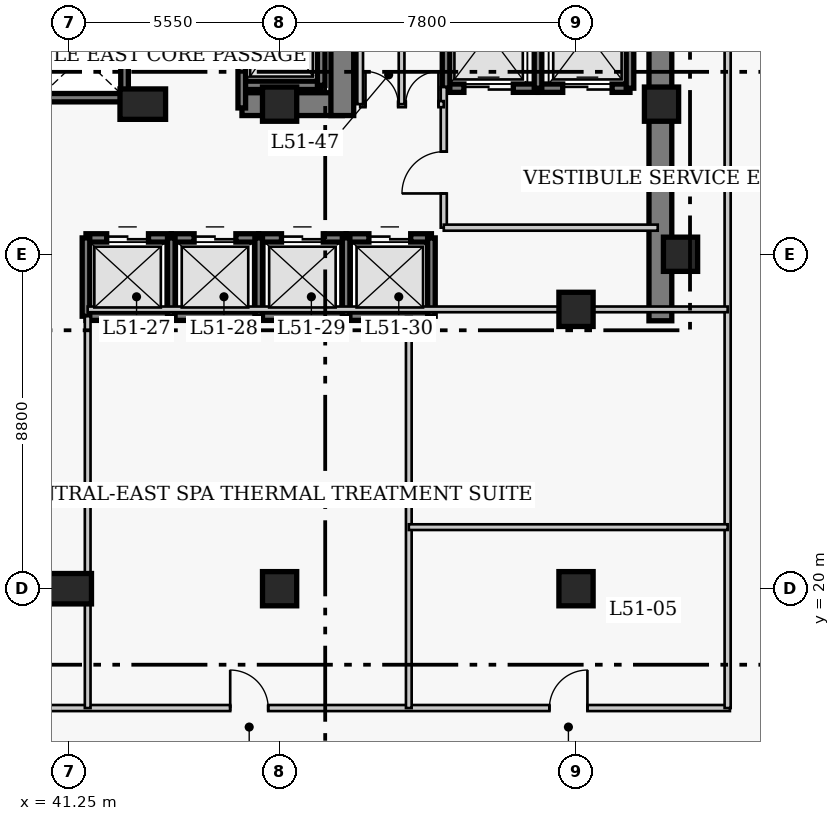
"""IFC4 building model, lengths in metres.
Left out: names, types, materials, properties, quantities, classifications, styles, units other than length and angle.
Written with IfcOpenShell. Run it as: python <this file> out.ifc"""

import sys

from ifc_helpers import new_model, si_unit, direction, frame, frame_2d, origin, origin_2d, place, context, subcontext, project, spatial, rectangle, extrude, element, fill, save


model = new_model("IFC4")
c1 = context("Model", 3, precision=1e-05, world=origin(), true_north=direction((0.0, 1.0)))
c2 = subcontext(c1, "Body", "Model", "MODEL_VIEW")
j1 = project(units=[si_unit("LENGTHUNIT", "METRE"), si_unit("PLANEANGLEUNIT", "RADIAN")], contexts=[c1])
p1 = place(None, origin())
s1 = spatial("IfcSite", under=j1, at=p1, CompositionType="ELEMENT")
p2 = place(p1, origin())
s2 = spatial("IfcBuilding", under=s1, at=p2, CompositionType="ELEMENT")
p3 = place(p2, frame((0.0, 0.0, 204.6)))
s3 = spatial("IfcBuildingStorey", under=s2, at=p3, CompositionType="ELEMENT", Elevation=204.6)
p4 = place(p3, frame((56.82, 27.05, 0.0), z_axis=(0.0, 0.0, 1.0), x_axis=(0.0, 1.0, 0.0)))
e1 = element("IfcWall", 1, at=p4, inside=s3, PredefinedType="SHEAR", context=c2, shape_type="SweptSolid", body=[
    extrude(rectangle(XDim=13.57, YDim=0.6, at=frame_2d((6.785, 0.0))), origin(), (0.0, 0.0, 1.0), 3.9),
])
p5 = place(p3, frame((45.81, 32.75, 0.0), z_axis=(0.0, 0.0, 1.0), x_axis=(1.0, 0.0, 0.0)))
e2 = element("IfcWall", 2, at=p5, inside=s3, PredefinedType="SHEAR", context=c2, shape_type="SweptSolid", body=[
    extrude(rectangle(XDim=2.64, YDim=0.6, at=frame_2d((1.32, 0.0))), origin(), (0.0, 0.0, 1.0), 3.9),
])
p6 = place(p3, frame((48.45, 32.45, 0.0), z_axis=(0.0, 0.0, 1.0), x_axis=(0.0, 1.0, 0.0)))
e3 = element("IfcWall", 3, at=p6, inside=s3, PredefinedType="SHEAR", context=c2, shape_type="SweptSolid", body=[
    extrude(rectangle(XDim=7.87, YDim=0.6, at=frame_2d((3.935, 0.0))), origin(), (0.0, 0.0, 1.0), 3.9),
])
p7 = place(p6, frame((5.75, 0.0, 0.0)))
e4 = element("IfcOpeningElement", 4, at=p7, cuts=e3, PredefinedType="OPENING", context=c2, shape_type="SweptSolid", body=[
    extrude(rectangle(XDim=1.1, YDim=2.15, at=frame_2d((0.55, 1.075))), frame((0.0, 0.31, 0.0), z_axis=(0.0, -1.0, 0.0), x_axis=(1.0, 0.0, 0.0)), (0.0, 0.0, 1.0), 0.62),
])
p8 = place(p3, frame((41.25, 20.0, 0.0), z_axis=(0.0, 0.0, 1.0), x_axis=(1.0, 0.0, 0.0)))
e5 = element("IfcColumn", 5, at=p8, inside=s3, PredefinedType="COLUMN", context=c2, shape_type="SweptSolid", body=[
    extrude(rectangle(XDim=1.2, YDim=0.8, at=origin_2d()), origin(), (0.0, 0.0, 1.0), 3.9),
])
for number, where, z_axis, x_axis in (
    (6, (46.8, 20.0, 0.0), (0.0, 0.0, 1.0), (1.0, 0.0, 0.0)),
    (7, (54.6, 20.0, 0.0), (0.0, 0.0, 1.0), (1.0, 0.0, 0.0)),
    (8, (57.35, 28.8, 0.0), (0.0, 0.0, 1.0), (1.0, 0.0, 0.0)),
):
    element("IfcColumn", number, at=place(p3, frame(where, z_axis=z_axis, x_axis=x_axis)), inside=s3, PredefinedType="COLUMN", context=c2, shape_type="SweptSolid", body=[
        extrude(rectangle(XDim=0.9, YDim=0.9, at=origin_2d()), origin(), (0.0, 0.0, 1.0), 3.9),
    ])
p9 = place(p3, frame((43.2, 32.75, 0.0), z_axis=(0.0, 0.0, 1.0), x_axis=(1.0, 0.0, 0.0)))
e9 = element("IfcColumn", 9, at=p9, inside=s3, PredefinedType="COLUMN", context=c2, shape_type="SweptSolid", body=[
    extrude(rectangle(XDim=1.2, YDim=0.8, at=origin_2d()), origin(), (0.0, 0.0, 1.0), 3.9),
])
for number, where, z_axis, x_axis in (
    (10, (46.8, 32.75, 0.0), (0.0, 0.0, 1.0), (1.0, 0.0, 0.0)),
    (11, (54.6, 27.35, 0.0), (0.0, 0.0, 1.0), (1.0, 0.0, 0.0)),
    (12, (56.85, 32.75, 0.0), (0.0, 0.0, 1.0), (1.0, 0.0, 0.0)),
):
    element("IfcColumn", number, at=place(p3, frame(where, z_axis=z_axis, x_axis=x_axis)), inside=s3, PredefinedType="COLUMN", context=c2, shape_type="SweptSolid", body=[
        extrude(rectangle(XDim=0.9, YDim=0.9, at=origin_2d()), origin(), (0.0, 0.0, 1.0), 3.9),
    ])
p10 = place(p3, frame((41.705, 29.23, 0.0), z_axis=(0.0, 0.0, 1.0), x_axis=(1.0, 0.0, 0.0)))
e13 = element("IfcWall", 13, at=p10, inside=s3, PredefinedType="SHEAR", context=c2, shape_type="SweptSolid", body=[
    extrude(rectangle(XDim=2.245, YDim=0.22, at=frame_2d((1.123, 0.0))), origin(), (0.0, 0.0, 1.0), 3.9),
])
p11 = place(p10, frame((0.545, 0.0, 0.0)))
e14 = element("IfcOpeningElement", 14, at=p11, cuts=e13, PredefinedType="OPENING", context=c2, shape_type="SweptSolid", body=[
    extrude(rectangle(XDim=1.1, YDim=2.15, at=frame_2d((0.55, 1.075))), frame((0.0, 0.12, 0.0), z_axis=(0.0, -1.0, 0.0), x_axis=(1.0, 0.0, 0.0)), (0.0, 0.0, 1.0), 0.24),
])
p12 = place(p3, frame((41.705, 27.17, 0.0), z_axis=(0.0, 0.0, 1.0), x_axis=(1.0, 0.0, 0.0)))
e15 = element("IfcWall", 15, at=p12, inside=s3, PredefinedType="SHEAR", context=c2, shape_type="SweptSolid", body=[
    extrude(rectangle(XDim=2.245, YDim=0.22, at=frame_2d((1.123, 0.0))), origin(), (0.0, 0.0, 1.0), 3.9),
])
p13 = place(p3, frame((41.705, 27.17, 0.0), z_axis=(0.0, 0.0, 1.0), x_axis=(0.0, 1.0, 0.0)))
e16 = element("IfcWall", 16, at=p13, inside=s3, PredefinedType="SHEAR", context=c2, shape_type="SweptSolid", body=[
    extrude(rectangle(XDim=2.06, YDim=0.2, at=frame_2d((1.03, 0.0))), origin(), (0.0, 0.0, 1.0), 3.9),
])
p14 = place(p3, frame((43.95, 29.23, 0.0), z_axis=(0.0, 0.0, 1.0), x_axis=(1.0, 0.0, 0.0)))
e17 = element("IfcWall", 17, at=p14, inside=s3, PredefinedType="SHEAR", context=c2, shape_type="SweptSolid", body=[
    extrude(rectangle(XDim=2.3, YDim=0.22, at=frame_2d((1.15, 0.0))), origin(), (0.0, 0.0, 1.0), 3.9),
])
p15 = place(p14, frame((0.6, 0.0, 0.0)))
e18 = element("IfcOpeningElement", 18, at=p15, cuts=e17, PredefinedType="OPENING", context=c2, shape_type="SweptSolid", body=[
    extrude(rectangle(XDim=1.1, YDim=2.15, at=frame_2d((0.55, 1.075))), frame((0.0, 0.12, 0.0), z_axis=(0.0, -1.0, 0.0), x_axis=(1.0, 0.0, 0.0)), (0.0, 0.0, 1.0), 0.24),
])
p16 = place(p3, frame((43.95, 27.17, 0.0), z_axis=(0.0, 0.0, 1.0), x_axis=(1.0, 0.0, 0.0)))
e19 = element("IfcWall", 19, at=p16, inside=s3, PredefinedType="SHEAR", context=c2, shape_type="SweptSolid", body=[
    extrude(rectangle(XDim=2.3, YDim=0.22, at=frame_2d((1.15, 0.0))), origin(), (0.0, 0.0, 1.0), 3.9),
])
p17 = place(p3, frame((43.95, 27.17, 0.0), z_axis=(0.0, 0.0, 1.0), x_axis=(0.0, 1.0, 0.0)))
e20 = element("IfcWall", 20, at=p17, inside=s3, PredefinedType="SHEAR", context=c2, shape_type="SweptSolid", body=[
    extrude(rectangle(XDim=2.06, YDim=0.2, at=frame_2d((1.03, 0.0))), origin(), (0.0, 0.0, 1.0), 3.9),
])
p18 = place(p3, frame((46.25, 29.23, 0.0), z_axis=(0.0, 0.0, 1.0), x_axis=(1.0, 0.0, 0.0)))
e21 = element("IfcWall", 21, at=p18, inside=s3, PredefinedType="SHEAR", context=c2, shape_type="SweptSolid", body=[
    extrude(rectangle(XDim=2.3, YDim=0.22, at=frame_2d((1.15, 0.0))), origin(), (0.0, 0.0, 1.0), 3.9),
])
p19 = place(p18, frame((0.6, 0.0, 0.0)))
e22 = element("IfcOpeningElement", 22, at=p19, cuts=e21, PredefinedType="OPENING", context=c2, shape_type="SweptSolid", body=[
    extrude(rectangle(XDim=1.1, YDim=2.15, at=frame_2d((0.55, 1.075))), frame((0.0, 0.12, 0.0), z_axis=(0.0, -1.0, 0.0), x_axis=(1.0, 0.0, 0.0)), (0.0, 0.0, 1.0), 0.24),
])
p20 = place(p3, frame((46.25, 27.17, 0.0), z_axis=(0.0, 0.0, 1.0), x_axis=(1.0, 0.0, 0.0)))
e23 = element("IfcWall", 23, at=p20, inside=s3, PredefinedType="SHEAR", context=c2, shape_type="SweptSolid", body=[
    extrude(rectangle(XDim=2.3, YDim=0.22, at=frame_2d((1.15, 0.0))), origin(), (0.0, 0.0, 1.0), 3.9),
])
p21 = place(p3, frame((46.25, 27.17, 0.0), z_axis=(0.0, 0.0, 1.0), x_axis=(0.0, 1.0, 0.0)))
e24 = element("IfcWall", 24, at=p21, inside=s3, PredefinedType="SHEAR", context=c2, shape_type="SweptSolid", body=[
    extrude(rectangle(XDim=2.06, YDim=0.2, at=frame_2d((1.03, 0.0))), origin(), (0.0, 0.0, 1.0), 3.9),
])
p22 = place(p3, frame((48.55, 29.23, 0.0), z_axis=(0.0, 0.0, 1.0), x_axis=(1.0, 0.0, 0.0)))
e25 = element("IfcWall", 25, at=p22, inside=s3, PredefinedType="SHEAR", context=c2, shape_type="SweptSolid", body=[
    extrude(rectangle(XDim=2.245, YDim=0.22, at=frame_2d((1.123, 0.0))), origin(), (0.0, 0.0, 1.0), 3.9),
])
p23 = place(p22, frame((0.6, 0.0, 0.0)))
e26 = element("IfcOpeningElement", 26, at=p23, cuts=e25, PredefinedType="OPENING", context=c2, shape_type="SweptSolid", body=[
    extrude(rectangle(XDim=1.1, YDim=2.15, at=frame_2d((0.55, 1.075))), frame((0.0, 0.12, 0.0), z_axis=(0.0, -1.0, 0.0), x_axis=(1.0, 0.0, 0.0)), (0.0, 0.0, 1.0), 0.24),
])
p24 = place(p3, frame((48.55, 27.17, 0.0), z_axis=(0.0, 0.0, 1.0), x_axis=(1.0, 0.0, 0.0)))
e27 = element("IfcWall", 27, at=p24, inside=s3, PredefinedType="SHEAR", context=c2, shape_type="SweptSolid", body=[
    extrude(rectangle(XDim=2.245, YDim=0.22, at=frame_2d((1.123, 0.0))), origin(), (0.0, 0.0, 1.0), 3.9),
])
for number, where, z_axis, x_axis in (
    (28, (48.55, 27.17, 0.0), (0.0, 0.0, 1.0), (0.0, 1.0, 0.0)),
    (29, (50.795, 27.17, 0.0), (0.0, 0.0, 1.0), (0.0, 1.0, 0.0)),
):
    element("IfcWall", number, at=place(p3, frame(where, z_axis=z_axis, x_axis=x_axis)), inside=s3, PredefinedType="SHEAR", context=c2, shape_type="SweptSolid", body=[
        extrude(rectangle(XDim=2.06, YDim=0.2, at=frame_2d((1.03, 0.0))), origin(), (0.0, 0.0, 1.0), 3.9),
    ])
p25 = place(p3, frame((40.4, 32.92, 0.0), z_axis=(0.0, 0.0, 1.0), x_axis=(1.0, 0.0, 0.0)))
e30 = element("IfcWall", 30, at=p25, inside=s3, PredefinedType="SHEAR", context=c2, shape_type="SweptSolid", body=[
    extrude(rectangle(XDim=2.32, YDim=0.22, at=frame_2d((1.16, 0.0))), origin(), (0.0, 0.0, 1.0), 3.9),
])
p26 = place(p3, frame((42.72, 32.92, 0.0), z_axis=(0.0, 0.0, 1.0), x_axis=(0.0, 1.0, 0.0)))
e31 = element("IfcWall", 31, at=p26, inside=s3, PredefinedType="SHEAR", context=c2, shape_type="SweptSolid", body=[
    extrude(rectangle(XDim=2.16, YDim=0.2, at=frame_2d((1.08, 0.0))), origin(), (0.0, 0.0, 1.0), 3.9),
])
p27 = place(p3, frame((51.18, 33.17, 0.0), z_axis=(0.0, 0.0, 1.0), x_axis=(1.0, 0.0, 0.0)))
e32 = element("IfcWall", 32, at=p27, inside=s3, PredefinedType="SHEAR", context=c2, shape_type="SweptSolid", body=[
    extrude(rectangle(XDim=2.42, YDim=0.22, at=frame_2d((1.21, 0.0))), origin(), (0.0, 0.0, 1.0), 3.9),
])
p28 = place(p27, frame((0.47, 0.0, 0.0)))
e33 = element("IfcOpeningElement", 33, at=p28, cuts=e32, PredefinedType="OPENING", context=c2, shape_type="SweptSolid", body=[
    extrude(rectangle(XDim=1.3, YDim=2.15, at=frame_2d((0.65, 1.075))), frame((0.0, 0.12, 0.0), z_axis=(0.0, -1.0, 0.0), x_axis=(1.0, 0.0, 0.0)), (0.0, 0.0, 1.0), 0.24),
])
p29 = place(p3, frame((51.18, 33.17, 0.0), z_axis=(0.0, 0.0, 1.0), x_axis=(0.0, 1.0, 0.0)))
e34 = element("IfcWall", 34, at=p29, inside=s3, PredefinedType="SHEAR", context=c2, shape_type="SweptSolid", body=[
    extrude(rectangle(XDim=2.86, YDim=0.2, at=frame_2d((1.43, 0.0))), origin(), (0.0, 0.0, 1.0), 3.9),
])
p30 = place(p3, frame((53.6, 33.17, 0.0), z_axis=(0.0, 0.0, 1.0), x_axis=(1.0, 0.0, 0.0)))
e35 = element("IfcWall", 35, at=p30, inside=s3, PredefinedType="SHEAR", context=c2, shape_type="SweptSolid", body=[
    extrude(rectangle(XDim=2.42, YDim=0.22, at=frame_2d((1.21, 0.0))), origin(), (0.0, 0.0, 1.0), 3.9),
])
p31 = place(p30, frame((0.65, 0.0, 0.0)))
e36 = element("IfcOpeningElement", 36, at=p31, cuts=e35, PredefinedType="OPENING", context=c2, shape_type="SweptSolid", body=[
    extrude(rectangle(XDim=1.3, YDim=2.15, at=frame_2d((0.65, 1.075))), frame((0.0, 0.12, 0.0), z_axis=(0.0, -1.0, 0.0), x_axis=(1.0, 0.0, 0.0)), (0.0, 0.0, 1.0), 0.24),
])
for number, where, z_axis, x_axis in (
    (37, (53.6, 33.17, 0.0), (0.0, 0.0, 1.0), (0.0, 1.0, 0.0)),
    (38, (56.02, 33.17, 0.0), (0.0, 0.0, 1.0), (0.0, 1.0, 0.0)),
):
    element("IfcWall", number, at=place(p3, frame(where, z_axis=z_axis, x_axis=x_axis)), inside=s3, PredefinedType="SHEAR", context=c2, shape_type="SweptSolid", body=[
        extrude(rectangle(XDim=2.86, YDim=0.2, at=frame_2d((1.43, 0.0))), origin(), (0.0, 0.0, 1.0), 3.9),
    ])
p32 = place(p3, frame((45.805, 33.245, 0.0), z_axis=(0.0, 0.0, 1.0), x_axis=(1.0, 0.0, 0.0)))
e39 = element("IfcWall", 39, at=p32, inside=s3, PredefinedType="SHEAR", context=c2, shape_type="SweptSolid", body=[
    extrude(rectangle(XDim=2.09, YDim=0.22, at=frame_2d((1.045, 0.0))), origin(), (0.0, 0.0, 1.0), 3.9),
])
p33 = place(p3, frame((45.805, 32.65, 0.0), z_axis=(0.0, 0.0, 1.0), x_axis=(0.0, 1.0, 0.0)))
e40 = element("IfcWall", 40, at=p33, inside=s3, PredefinedType="SHEAR", context=c2, shape_type="SweptSolid", body=[
    extrude(rectangle(XDim=3.505, YDim=0.2, at=frame_2d((1.752, 0.0))), origin(), (0.0, 0.0, 1.0), 3.9),
])
p34 = place(p3, frame((47.895, 33.245, 0.0), z_axis=(0.0, 0.0, 1.0), x_axis=(0.0, 1.0, 0.0)))
e41 = element("IfcWall", 41, at=p34, inside=s3, PredefinedType="SHEAR", context=c2, shape_type="SweptSolid", body=[
    extrude(rectangle(XDim=2.91, YDim=0.2, at=frame_2d((1.455, 0.0))), origin(), (0.0, 0.0, 1.0), 3.9),
])
p35 = place(p3, frame((51.12, 29.5, 0.0), z_axis=(0.0, 0.0, 1.0), x_axis=(0.0, 1.0, 0.0)))
e42 = element("IfcWall", 42, at=p35, inside=s3, PredefinedType="PARTITIONING", context=c2, shape_type="SweptSolid", body=[
    extrude(rectangle(XDim=3.7, YDim=0.16, at=frame_2d((1.85, 0.0))), origin(), (0.0, 0.0, 1.0), 3.65),
])
p36 = place(p35, frame((0.9, 0.0, 0.0)))
e43 = element("IfcOpeningElement", 43, at=p36, cuts=e42, PredefinedType="OPENING", context=c2, shape_type="SweptSolid", body=[
    extrude(rectangle(XDim=1.1, YDim=2.15, at=frame_2d((0.55, 1.075))), frame((0.0, 0.09, 0.0), z_axis=(0.0, -1.0, 0.0), x_axis=(1.0, 0.0, 0.0)), (0.0, 0.0, 1.0), 0.18),
])
p37 = place(p3, frame((51.12, 29.5, 0.0), z_axis=(0.0, 0.0, 1.0), x_axis=(1.0, 0.0, 0.0)))
e44 = element("IfcWall", 44, at=p37, inside=s3, PredefinedType="PARTITIONING", context=c2, shape_type="SweptSolid", body=[
    extrude(rectangle(XDim=5.63, YDim=0.16, at=frame_2d((2.815, 0.0))), origin(), (0.0, 0.0, 1.0), 3.65),
])
p38 = place(p3, frame((48.92, 32.75, 0.0), z_axis=(0.0, 0.0, 1.0), x_axis=(1.0, 0.0, 0.0)))
e45 = element("IfcWall", 45, at=p38, inside=s3, PredefinedType="PARTITIONING", context=c2, shape_type="SweptSolid", body=[
    extrude(rectangle(XDim=2.2, YDim=0.16, at=frame_2d((1.1, 0.0))), origin(), (0.0, 0.0, 1.0), 3.65),
])
p39 = place(p38, frame((0.14, 0.0, 0.0)))
e46 = element("IfcOpeningElement", 46, at=p39, cuts=e45, PredefinedType="OPENING", context=c2, shape_type="SweptSolid", body=[
    extrude(rectangle(XDim=0.86, YDim=2.05, at=frame_2d((0.43, 1.025))), frame((0.0, 0.09, 0.0), z_axis=(0.0, -1.0, 0.0), x_axis=(1.0, 0.0, 0.0)), (0.0, 0.0, 1.0), 0.18),
])
p40 = place(p38, frame((1.2, 0.0, 0.0)))
e47 = element("IfcOpeningElement", 47, at=p40, cuts=e45, PredefinedType="OPENING", context=c2, shape_type="SweptSolid", body=[
    extrude(rectangle(XDim=0.86, YDim=2.05, at=frame_2d((0.43, 1.025))), frame((0.0, 0.09, 0.0), z_axis=(0.0, -1.0, 0.0), x_axis=(1.0, 0.0, 0.0)), (0.0, 0.0, 1.0), 0.18),
])
for number, where, z_axis, x_axis in (
    (48, (48.92, 32.75, 0.0), (0.0, 0.0, 1.0), (0.0, 1.0, 0.0)),
    (49, (50.01, 32.75, 0.0), (0.0, 0.0, 1.0), (0.0, 1.0, 0.0)),
):
    element("IfcWall", number, at=place(p3, frame(where, z_axis=z_axis, x_axis=x_axis)), inside=s3, PredefinedType="PARTITIONING", context=c2, shape_type="SweptSolid", body=[
        extrude(rectangle(XDim=3.62, YDim=0.15, at=frame_2d((1.81, 0.0))), origin(), (0.0, 0.0, 1.0), 3.65),
    ])
p41 = place(p3, frame((35.85, 16.86, 0.0), z_axis=(0.0, 0.0, 1.0), x_axis=(1.0, 0.0, 0.0)))
e50 = element("IfcWall", 50, at=p41, inside=s3, PredefinedType="PARTITIONING", context=c2, shape_type="SweptSolid", body=[
    extrude(rectangle(XDim=22.8, YDim=0.16, at=frame_2d((11.4, 0.0))), origin(), (0.0, 0.0, 1.0), 3.65),
])
p42 = place(p41, frame((9.65, 0.0, 0.0)))
e51 = element("IfcOpeningElement", 51, at=p42, cuts=e50, PredefinedType="OPENING", context=c2, shape_type="SweptSolid", body=[
    extrude(rectangle(XDim=1.0, YDim=2.15, at=frame_2d((0.5, 1.075))), frame((0.0, 0.09, 0.0), z_axis=(0.0, -1.0, 0.0), x_axis=(1.0, 0.0, 0.0)), (0.0, 0.0, 1.0), 0.18),
])
p43 = place(p41, frame((18.05, 0.0, 0.0)))
e52 = element("IfcOpeningElement", 52, at=p43, cuts=e50, PredefinedType="OPENING", context=c2, shape_type="SweptSolid", body=[
    extrude(rectangle(XDim=1.0, YDim=2.15, at=frame_2d((0.5, 1.075))), frame((0.0, 0.09, 0.0), z_axis=(0.0, -1.0, 0.0), x_axis=(1.0, 0.0, 0.0)), (0.0, 0.0, 1.0), 0.18),
])
p44 = place(p3, frame((58.59, 16.86, 0.0), z_axis=(0.0, 0.0, 1.0), x_axis=(0.0, 1.0, 0.0)))
e53 = element("IfcWall", 53, at=p44, inside=s3, PredefinedType="PARTITIONING", context=c2, shape_type="SweptSolid", body=[
    extrude(rectangle(XDim=23.79, YDim=0.16, at=frame_2d((11.895, 0.0))), origin(), (0.0, 0.0, 1.0), 3.246),
])
p45 = place(p3, frame((41.75, 16.86, 0.0), z_axis=(0.0, 0.0, 1.0), x_axis=(0.0, 1.0, 0.0)))
e54 = element("IfcWall", 54, at=p45, inside=s3, PredefinedType="PARTITIONING", context=c2, shape_type="SweptSolid", body=[
    extrude(rectangle(XDim=10.31, YDim=0.15, at=frame_2d((5.155, 0.0))), origin(), (0.0, 0.0, 1.0), 3.65),
])
p46 = place(p3, frame((50.2, 16.86, 0.0), z_axis=(0.0, 0.0, 1.0), x_axis=(0.0, 1.0, 0.0)))
e55 = element("IfcWall", 55, at=p46, inside=s3, PredefinedType="PARTITIONING", context=c2, shape_type="SweptSolid", body=[
    extrude(rectangle(XDim=10.29, YDim=0.15, at=frame_2d((5.145, 0.0))), origin(), (0.0, 0.0, 1.0), 3.65),
])
p47 = place(p3, frame((41.75, 27.35, 0.0), z_axis=(0.0, 0.0, 1.0), x_axis=(1.0, 0.0, 0.0)))
e56 = element("IfcWall", 56, at=p47, inside=s3, PredefinedType="PARTITIONING", context=c2, shape_type="SweptSolid", body=[
    extrude(rectangle(XDim=16.84, YDim=0.15, at=frame_2d((8.42, 0.0))), origin(), (0.0, 0.0, 1.0), 3.65),
])
p48 = place(p3, frame((50.2, 21.62, 0.0), z_axis=(0.0, 0.0, 1.0), x_axis=(1.0, 0.0, 0.0)))
e57 = element("IfcWall", 57, at=p48, inside=s3, PredefinedType="PARTITIONING", context=c2, shape_type="SweptSolid", body=[
    extrude(rectangle(XDim=8.39, YDim=0.15, at=frame_2d((4.195, 0.0))), origin(), (0.0, 0.0, 1.0), 3.65),
])
p49 = place(p11, origin())
e58 = element("IfcDoor", 58, at=p49, inside=s3, OperationType="DOUBLE_DOOR_SLIDING", PredefinedType="DOOR", context=c2, shape_type="SweptSolid", body=[
    extrude(rectangle(XDim=1.1, YDim=2.15, at=frame_2d((0.55, 1.075))), frame((0.0, 0.025, 0.0), z_axis=(0.0, -1.0, 0.0), x_axis=(1.0, 0.0, 0.0)), (0.0, 0.0, 1.0), 0.05),
])
fill(e14, e58)
p50 = place(p15, origin())
e59 = element("IfcDoor", 59, at=p50, inside=s3, OperationType="DOUBLE_DOOR_SLIDING", PredefinedType="DOOR", context=c2, shape_type="SweptSolid", body=[
    extrude(rectangle(XDim=1.1, YDim=2.15, at=frame_2d((0.55, 1.075))), frame((0.0, 0.025, 0.0), z_axis=(0.0, -1.0, 0.0), x_axis=(1.0, 0.0, 0.0)), (0.0, 0.0, 1.0), 0.05),
])
fill(e18, e59)
p51 = place(p19, origin())
e60 = element("IfcDoor", 60, at=p51, inside=s3, OperationType="DOUBLE_DOOR_SLIDING", PredefinedType="DOOR", context=c2, shape_type="SweptSolid", body=[
    extrude(rectangle(XDim=1.1, YDim=2.15, at=frame_2d((0.55, 1.075))), frame((0.0, 0.025, 0.0), z_axis=(0.0, -1.0, 0.0), x_axis=(1.0, 0.0, 0.0)), (0.0, 0.0, 1.0), 0.05),
])
fill(e22, e60)
p52 = place(p23, origin())
e61 = element("IfcDoor", 61, at=p52, inside=s3, OperationType="DOUBLE_DOOR_SLIDING", PredefinedType="DOOR", context=c2, shape_type="SweptSolid", body=[
    extrude(rectangle(XDim=1.1, YDim=2.15, at=frame_2d((0.55, 1.075))), frame((0.0, 0.025, 0.0), z_axis=(0.0, -1.0, 0.0), x_axis=(1.0, 0.0, 0.0)), (0.0, 0.0, 1.0), 0.05),
])
fill(e26, e61)
p53 = place(p28, origin())
e62 = element("IfcDoor", 62, at=p53, inside=s3, OperationType="DOUBLE_DOOR_SLIDING", PredefinedType="DOOR", context=c2, shape_type="SweptSolid", body=[
    extrude(rectangle(XDim=1.3, YDim=2.15, at=frame_2d((0.65, 1.075))), frame((0.0, 0.025, 0.0), z_axis=(0.0, -1.0, 0.0), x_axis=(1.0, 0.0, 0.0)), (0.0, 0.0, 1.0), 0.05),
])
fill(e33, e62)
p54 = place(p31, origin())
e63 = element("IfcDoor", 63, at=p54, inside=s3, OperationType="DOUBLE_DOOR_SLIDING", PredefinedType="DOOR", context=c2, shape_type="SweptSolid", body=[
    extrude(rectangle(XDim=1.3, YDim=2.15, at=frame_2d((0.65, 1.075))), frame((0.0, 0.025, 0.0), z_axis=(0.0, -1.0, 0.0), x_axis=(1.0, 0.0, 0.0)), (0.0, 0.0, 1.0), 0.05),
])
fill(e36, e63)
p55 = place(p36, origin())
e64 = element("IfcDoor", 64, at=p55, inside=s3, OperationType="SINGLE_SWING_LEFT", PredefinedType="DOOR", context=c2, shape_type="SweptSolid", body=[
    extrude(rectangle(XDim=1.1, YDim=2.15, at=frame_2d((0.55, 1.075))), frame((0.0, 0.025, 0.0), z_axis=(0.0, -1.0, 0.0), x_axis=(1.0, 0.0, 0.0)), (0.0, 0.0, 1.0), 0.05),
])
fill(e43, e64)
p56 = place(p39, origin())
e65 = element("IfcDoor", 65, at=p56, inside=s3, OperationType="SINGLE_SWING_LEFT", PredefinedType="DOOR", context=c2, shape_type="SweptSolid", body=[
    extrude(rectangle(XDim=0.86, YDim=2.05, at=frame_2d((0.43, 1.025))), frame((0.0, 0.025, 0.0), z_axis=(0.0, -1.0, 0.0), x_axis=(1.0, 0.0, 0.0)), (0.0, 0.0, 1.0), 0.05),
])
fill(e46, e65)
p57 = place(p40, origin())
e66 = element("IfcDoor", 66, at=p57, inside=s3, OperationType="SINGLE_SWING_RIGHT", PredefinedType="DOOR", context=c2, shape_type="SweptSolid", body=[
    extrude(rectangle(XDim=0.86, YDim=2.05, at=frame_2d((0.43, 1.025))), frame((0.0, 0.025, 0.0), z_axis=(0.0, -1.0, 0.0), x_axis=(1.0, 0.0, 0.0)), (0.0, 0.0, 1.0), 0.05),
])
fill(e47, e66)
p58 = place(p42, origin())
e67 = element("IfcDoor", 67, at=p58, inside=s3, OperationType="SINGLE_SWING_LEFT", PredefinedType="DOOR", context=c2, shape_type="SweptSolid", body=[
    extrude(rectangle(XDim=1.0, YDim=2.15, at=frame_2d((0.5, 1.075))), frame((0.0, 0.025, 0.0), z_axis=(0.0, -1.0, 0.0), x_axis=(1.0, 0.0, 0.0)), (0.0, 0.0, 1.0), 0.05),
])
fill(e51, e67)
p59 = place(p43, origin())
e68 = element("IfcDoor", 68, at=p59, inside=s3, OperationType="SINGLE_SWING_RIGHT", PredefinedType="DOOR", context=c2, shape_type="SweptSolid", body=[
    extrude(rectangle(XDim=1.0, YDim=2.15, at=frame_2d((0.5, 1.075))), frame((0.0, 0.025, 0.0), z_axis=(0.0, -1.0, 0.0), x_axis=(1.0, 0.0, 0.0)), (0.0, 0.0, 1.0), 0.05),
])
fill(e52, e68)
save(model, sys.argv[1])
